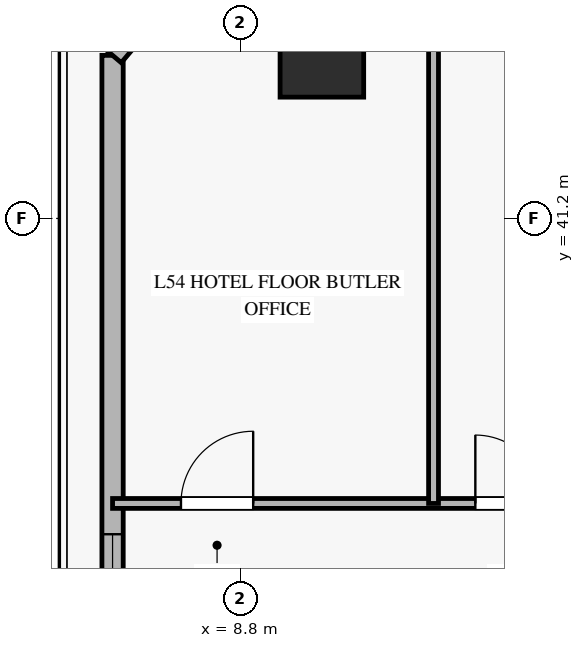
"""IFC4 building model, lengths in metres.
Left out: names, types, materials, properties, quantities, classifications, styles, units other than length and angle.
Written with IfcOpenShell. Run it as: python <this file> out.ifc"""

import sys

from ifc_helpers import new_model, si_unit, direction, frame, frame_2d, origin, origin_2d, place, context, subcontext, project, spatial, rectangle, hollow_rectangle, extrude, source, transform, mapped, element, fill, save


model = new_model("IFC4")
c1 = context("Model", 3, precision=1e-05, world=origin(), true_north=direction((0.0, 1.0)))
c2 = subcontext(c1, "Body", "Model", "MODEL_VIEW")
j1 = project(units=[si_unit("LENGTHUNIT", "METRE"), si_unit("PLANEANGLEUNIT", "RADIAN")], contexts=[c1])
p1 = place(None, origin())
s1 = spatial("IfcSite", under=j1, at=p1, CompositionType="ELEMENT")
p2 = place(p1, origin())
s2 = spatial("IfcBuilding", under=s1, at=p2, CompositionType="ELEMENT")
p3 = place(p2, frame((0.0, 0.0, 213.2)))
s3 = spatial("IfcBuildingStorey", under=s2, at=p3, CompositionType="ELEMENT", Elevation=213.2)
m1 = source(origin(), c2, "Body", "SweptSolid", [
    extrude(hollow_rectangle(XDim=1.1, YDim=1.1, WallThickness=0.05, at=origin_2d()), origin(), (0.0, 0.0, 1.0), 3.27),
])
p4 = place(p3, frame((9.872, 43.346, 0.0), z_axis=(0.0, 0.0, 1.0), x_axis=(1.0, 0.0, 0.0)))
e1 = element("IfcColumn", 1, at=p4, inside=s3, PredefinedType="COLUMN", context=c2, shape_type="MappedRepresentation", body=[
    mapped(m1, transform((0.0, 0.0, 0.0), x_axis=(1.0, 0.0, 0.0), y_axis=(0.0, 1.0, 0.0), z_axis=(0.0, 0.0, 1.0), scale=1.0)),
])
p5 = place(p3, frame((7.118, 29.509, 0.0), z_axis=(0.0, 0.0, 1.0), x_axis=(0.0, 1.0, 0.0)))
e2 = element("IfcWall", 2, at=p5, inside=s3, PredefinedType="SOLIDWALL", context=c2, shape_type="SweptSolid", body=[
    extrude(rectangle(XDim=13.837, YDim=0.28, at=frame_2d((6.918, 0.0))), origin(), (0.0, 0.0, 1.0), 2.75),
])
p6 = place(p5, frame((5.536, 0.0, 0.45)))
e3 = element("IfcOpeningElement", 3, at=p6, cuts=e2, PredefinedType="OPENING", context=c2, shape_type="SweptSolid", body=[
    extrude(rectangle(XDim=2.0, YDim=2.0, at=frame_2d((1.0, 1.0))), frame((0.0, 0.15, 0.0), z_axis=(0.0, -1.0, 0.0), x_axis=(1.0, 0.0, 0.0)), (0.0, 0.0, 1.0), 0.3),
])
p7 = place(p3, frame((9.572, 46.25, 0.0), z_axis=(0.0, 0.0, 1.0), x_axis=(-0.645455651603, -0.763797749286, 0.0)))
e4 = element("IfcWall", 4, at=p7, inside=s3, PredefinedType="SOLIDWALL", context=c2, shape_type="SweptSolid", body=[
    extrude(rectangle(XDim=3.802, YDim=0.3, at=frame_2d((1.901, 0.0))), origin(), (0.0, 0.0, 1.0), 2.75),
])
p8 = place(p7, frame((1.101, 0.0, 0.45)))
e5 = element("IfcOpeningElement", 5, at=p8, cuts=e4, PredefinedType="OPENING", context=c2, shape_type="SweptSolid", body=[
    extrude(rectangle(XDim=1.6, YDim=2.0, at=frame_2d((0.8, 1.0))), frame((0.0, 0.16, 0.0), z_axis=(0.0, -1.0, 0.0), x_axis=(1.0, 0.0, 0.0)), (0.0, 0.0, 1.0), 0.32),
])
p9 = place(p3, frame((7.118, 37.45, 0.0), z_axis=(0.0, 0.0, 1.0), x_axis=(1.0, 0.0, 0.0)))
e6 = element("IfcWall", 6, at=p9, inside=s3, PredefinedType="PARTITIONING", context=c2, shape_type="SweptSolid", body=[
    extrude(rectangle(XDim=12.132, YDim=0.13, at=frame_2d((6.066, 0.0))), origin(), (0.0, 0.0, 1.0), 2.755),
])
p10 = place(p9, frame((0.9, 0.0, 0.0)))
e7 = element("IfcOpeningElement", 7, at=p10, cuts=e6, PredefinedType="OPENING", context=c2, shape_type="SweptSolid", body=[
    extrude(rectangle(XDim=0.95, YDim=2.1, at=frame_2d((0.475, 1.05))), frame((0.0, 0.075, 0.0), z_axis=(0.0, -1.0, 0.0), x_axis=(1.0, 0.0, 0.0)), (0.0, 0.0, 1.0), 0.15),
])
p11 = place(p9, frame((4.773, 0.0, 0.0)))
e8 = element("IfcOpeningElement", 8, at=p11, cuts=e6, PredefinedType="OPENING", context=c2, shape_type="SweptSolid", body=[
    extrude(rectangle(XDim=0.9, YDim=2.1, at=frame_2d((0.45, 1.05))), frame((0.0, 0.075, 0.0), z_axis=(0.0, -1.0, 0.0), x_axis=(1.0, 0.0, 0.0)), (0.0, 0.0, 1.0), 0.15),
])
p12 = place(p3, frame((11.341, 37.45, 0.0), z_axis=(0.0, 0.0, 1.0), x_axis=(0.0, 1.0, 0.0)))
e9 = element("IfcWall", 9, at=p12, inside=s3, PredefinedType="PARTITIONING", context=c2, shape_type="SweptSolid", body=[
    extrude(rectangle(XDim=8.8, YDim=0.13, at=frame_2d((4.4, 0.0))), origin(), (0.0, 0.0, 1.0), 3.27),
])
m2 = source(origin(), c2, "Body", "SweptSolid", [
    extrude(rectangle(XDim=2.0, YDim=2.0, at=frame_2d((1.0, 1.0))), frame((0.0, 0.03, 0.0), z_axis=(0.0, -1.0, 0.0), x_axis=(1.0, 0.0, 0.0)), (0.0, 0.0, 1.0), 0.06),
])
p13 = place(p6, origin())
e10 = element("IfcWindow", 10, at=p13, inside=s3, PartitioningType="SINGLE_PANEL", PredefinedType="WINDOW", context=c2, shape_type="MappedRepresentation", body=[
    mapped(m2, transform((0.0, 0.0, 0.0), x_axis=(1.0, 0.0, 0.0), y_axis=(0.0, 1.0, 0.0), z_axis=(0.0, 0.0, 1.0), scale=1.0)),
])
fill(e3, e10)
m3 = source(origin(), c2, "Body", "SweptSolid", [
    extrude(rectangle(XDim=0.95, YDim=2.1, at=frame_2d((0.475, 1.05))), frame((0.0, 0.025, 0.0), z_axis=(0.0, -1.0, 0.0), x_axis=(1.0, 0.0, 0.0)), (0.0, 0.0, 1.0), 0.05),
])
p14 = place(p10, origin())
e11 = element("IfcDoor", 11, at=p14, inside=s3, OperationType="SINGLE_SWING_RIGHT", PredefinedType="DOOR", context=c2, shape_type="MappedRepresentation", body=[
    mapped(m3, transform((0.0, 0.0, 0.0), x_axis=(1.0, 0.0, 0.0), y_axis=(0.0, 1.0, 0.0), z_axis=(0.0, 0.0, 1.0), scale=1.0)),
])
fill(e7, e11)
m4 = source(origin(), c2, "Body", "SweptSolid", [
    extrude(rectangle(XDim=0.9, YDim=2.1, at=frame_2d((0.45, 1.05))), frame((0.0, 0.025, 0.0), z_axis=(0.0, -1.0, 0.0), x_axis=(1.0, 0.0, 0.0)), (0.0, 0.0, 1.0), 0.05),
])
p15 = place(p11, origin())
e12 = element("IfcDoor", 12, at=p15, inside=s3, OperationType="SINGLE_SWING_LEFT", PredefinedType="DOOR", context=c2, shape_type="MappedRepresentation", body=[
    mapped(m4, transform((0.0, 0.0, 0.0), x_axis=(1.0, 0.0, 0.0), y_axis=(0.0, 1.0, 0.0), z_axis=(0.0, 0.0, 1.0), scale=1.0)),
])
fill(e8, e12)
save(model, sys.argv[1])
